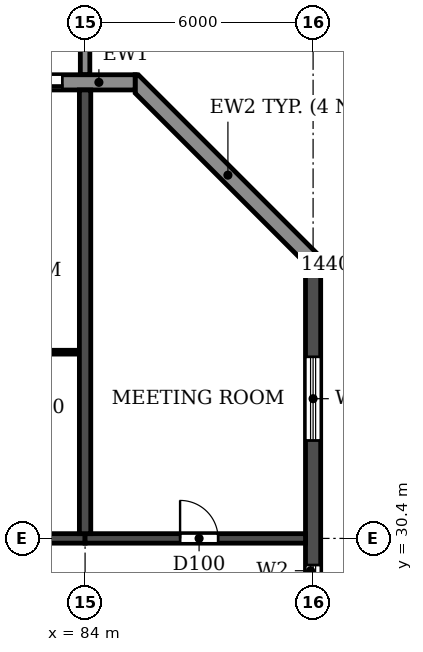
"""IFC4 building model, lengths in metres.
Left out: names, types, materials, properties, quantities, classifications, styles, units other than length and angle.
Written with IfcOpenShell. Run it as: python <this file> out.ifc"""

import sys

from ifc_helpers import new_model, si_unit, direction, frame, frame_2d, origin, place, context, subcontext, project, spatial, polyline, rectangle, outline, extrude, source, transform, mapped, element, fill, save


model = new_model("IFC4")
c1 = context("Model", 3, precision=1e-05, world=origin(), true_north=direction((0.0, 1.0)))
c2 = subcontext(c1, "Body", "Model", "MODEL_VIEW")
j1 = project(units=[si_unit("LENGTHUNIT", "METRE"), si_unit("PLANEANGLEUNIT", "RADIAN")], contexts=[c1])
p1 = place(None, origin())
s1 = spatial("IfcSite", under=j1, at=p1, CompositionType="ELEMENT")
p2 = place(p1, origin())
s2 = spatial("IfcBuilding", under=s1, at=p2, CompositionType="ELEMENT")
p3 = place(p2, frame((0.0, 0.0, 132.3)))
s3 = spatial("IfcBuildingStorey", under=s2, at=p3, CompositionType="ELEMENT", Elevation=132.3)
p4 = place(p3, frame((84.0, 30.525, 0.0), z_axis=(0.0, 0.0, 1.0), x_axis=(0.0, 1.0, 0.0)))
e1 = element("IfcWall", 1, at=p4, inside=s3, PredefinedType="SHEAR", context=c2, shape_type="SweptSolid", body=[
    extrude(rectangle(XDim=11.675, YDim=0.3, at=frame_2d((5.837, 0.0))), origin(), (0.0, 0.0, 1.0), 3.07),
])
p5 = place(p3, frame((90.0, 4.683, 0.0), z_axis=(0.0, 0.0, 1.0), x_axis=(0.0, 1.0, 0.0)))
e2 = element("IfcWall", 2, at=p5, inside=s3, PredefinedType="SHEAR", context=c2, shape_type="SweptSolid", body=[
    extrude(rectangle(XDim=33.034, YDim=0.4, at=frame_2d((16.517, 0.0))), origin(), (0.0, 0.0, 1.0), 3.07),
])
p6 = place(p5, frame((23.817, 0.0, 0.9)))
e3 = element("IfcOpeningElement", 3, at=p6, cuts=e2, PredefinedType="OPENING", context=c2, shape_type="SweptSolid", body=[
    extrude(rectangle(XDim=1.2, YDim=1.5, at=frame_2d((0.6, 0.75))), frame((0.0, 0.21, 0.0), z_axis=(0.0, -1.0, 0.0), x_axis=(1.0, 0.0, 0.0)), (0.0, 0.0, 1.0), 0.42),
])
p7 = place(p5, frame((8.017, 0.0, 0.9)))
e4 = element("IfcOpeningElement", 4, at=p7, cuts=e2, PredefinedType="OPENING", context=c2, shape_type="SweptSolid", body=[
    extrude(rectangle(XDim=1.2, YDim=1.5, at=frame_2d((0.6, 0.75))), frame((0.0, 0.21, 0.0), z_axis=(0.0, -1.0, 0.0), x_axis=(1.0, 0.0, 0.0)), (0.0, 0.0, 1.0), 0.42),
])
p8 = place(p5, frame((28.293, 0.0, 0.6)))
e5 = element("IfcOpeningElement", 5, at=p8, cuts=e2, PredefinedType="OPENING", context=c2, shape_type="SweptSolid", body=[
    extrude(rectangle(XDim=2.2, YDim=1.8, at=frame_2d((1.1, 0.9))), frame((0.0, 0.21, 0.0), z_axis=(0.0, -1.0, 0.0), x_axis=(1.0, 0.0, 0.0)), (0.0, 0.0, 1.0), 0.42),
])
p9 = place(p5, frame((2.541, 0.0, 0.6)))
e6 = element("IfcOpeningElement", 6, at=p9, cuts=e2, PredefinedType="OPENING", context=c2, shape_type="SweptSolid", body=[
    extrude(rectangle(XDim=2.2, YDim=1.8, at=frame_2d((1.1, 0.9))), frame((0.0, 0.21, 0.0), z_axis=(0.0, -1.0, 0.0), x_axis=(1.0, 0.0, 0.0)), (0.0, 0.0, 1.0), 0.42),
])
p10 = place(p3, frame((78.0, 30.4, 0.0), z_axis=(0.0, 0.0, 1.0), x_axis=(1.0, 0.0, 0.0)))
e7 = element("IfcWall", 7, at=p10, inside=s3, PredefinedType="SHEAR", context=c2, shape_type="SweptSolid", body=[
    extrude(rectangle(XDim=6.0, YDim=0.25, at=frame_2d((3.0, 0.0))), origin(), (0.0, 0.0, 1.0), 2.47),
])
p11 = place(p10, frame((2.55, 0.0, 0.0)))
e8 = element("IfcOpeningElement", 8, at=p11, cuts=e7, PredefinedType="OPENING", context=c2, shape_type="SweptSolid", body=[
    extrude(rectangle(XDim=1.0, YDim=2.1, at=frame_2d((0.5, 1.05))), frame((0.0, 0.135, 0.0), z_axis=(0.0, -1.0, 0.0), x_axis=(1.0, 0.0, 0.0)), (0.0, 0.0, 1.0), 0.27),
])
p12 = place(p3, frame((84.0, 30.4, 0.0), z_axis=(0.0, 0.0, 1.0), x_axis=(1.0, 0.0, 0.0)))
e9 = element("IfcWall", 9, at=p12, inside=s3, PredefinedType="SHEAR", context=c2, shape_type="SweptSolid", body=[
    extrude(rectangle(XDim=5.8, YDim=0.25, at=frame_2d((2.9, 0.0))), origin(), (0.0, 0.0, 1.0), 2.47),
])
p13 = place(p12, frame((2.5, 0.0, 0.0)))
e10 = element("IfcOpeningElement", 10, at=p13, cuts=e9, PredefinedType="OPENING", context=c2, shape_type="SweptSolid", body=[
    extrude(rectangle(XDim=1.0, YDim=2.1, at=frame_2d((0.5, 1.05))), frame((0.0, 0.135, 0.0), z_axis=(0.0, -1.0, 0.0), x_axis=(1.0, 0.0, 0.0)), (0.0, 0.0, 1.0), 0.27),
])
p14 = place(p3, origin())
e11 = element("IfcWall", 11, at=p14, inside=s3, PredefinedType="STANDARD", context=c2, shape_type="SweptSolid", body=[
    extrude(outline(polyline([(90.2, 37.717), (90.2, 37.8), (85.4, 42.6), (85.317, 42.6), (85.317, 42.117), (89.717, 37.717), (90.2, 37.717)])), origin(), (0.0, 0.0, 1.0), 3.07),
])
p15 = place(p3, frame((85.317, 42.4, 0.0), z_axis=(0.0, 0.0, 1.0), x_axis=(-1.0, 0.0, 0.0)))
e12 = element("IfcWall", 12, at=p15, inside=s3, PredefinedType="STANDARD", context=c2, shape_type="SweptSolid", body=[
    extrude(rectangle(XDim=68.634, YDim=0.4, at=frame_2d((34.317, 0.0))), origin(), (0.0, 0.0, 1.0), 3.07),
])
p16 = place(p15, frame((64.917, 0.0, 0.0)))
e13 = element("IfcOpeningElement", 13, at=p16, cuts=e12, PredefinedType="OPENING", context=c2, shape_type="SweptSolid", body=[
    extrude(rectangle(XDim=1.8, YDim=2.4, at=frame_2d((0.9, 1.2))), frame((0.0, 0.21, 0.0), z_axis=(0.0, -1.0, 0.0), x_axis=(1.0, 0.0, 0.0)), (0.0, 0.0, 1.0), 0.42),
])
p17 = place(p15, frame((61.717, 0.0, 0.9)))
e14 = element("IfcOpeningElement", 14, at=p17, cuts=e12, PredefinedType="OPENING", context=c2, shape_type="SweptSolid", body=[
    extrude(rectangle(XDim=2.2, YDim=1.5, at=frame_2d((1.1, 0.75))), frame((0.0, 0.21, 0.0), z_axis=(0.0, -1.0, 0.0), x_axis=(1.0, 0.0, 0.0)), (0.0, 0.0, 1.0), 0.42),
])
p18 = place(p15, frame((58.717, 0.0, 0.9)))
e15 = element("IfcOpeningElement", 15, at=p18, cuts=e12, PredefinedType="OPENING", context=c2, shape_type="SweptSolid", body=[
    extrude(rectangle(XDim=2.2, YDim=1.5, at=frame_2d((1.1, 0.75))), frame((0.0, 0.21, 0.0), z_axis=(0.0, -1.0, 0.0), x_axis=(1.0, 0.0, 0.0)), (0.0, 0.0, 1.0), 0.42),
])
p19 = place(p15, frame((55.717, 0.0, 0.9)))
e16 = element("IfcOpeningElement", 16, at=p19, cuts=e12, PredefinedType="OPENING", context=c2, shape_type="SweptSolid", body=[
    extrude(rectangle(XDim=2.2, YDim=1.5, at=frame_2d((1.1, 0.75))), frame((0.0, 0.21, 0.0), z_axis=(0.0, -1.0, 0.0), x_axis=(1.0, 0.0, 0.0)), (0.0, 0.0, 1.0), 0.42),
])
p20 = place(p15, frame((52.917, 0.0, 0.0)))
e17 = element("IfcOpeningElement", 17, at=p20, cuts=e12, PredefinedType="OPENING", context=c2, shape_type="SweptSolid", body=[
    extrude(rectangle(XDim=1.8, YDim=2.4, at=frame_2d((0.9, 1.2))), frame((0.0, 0.21, 0.0), z_axis=(0.0, -1.0, 0.0), x_axis=(1.0, 0.0, 0.0)), (0.0, 0.0, 1.0), 0.42),
])
p21 = place(p15, frame((49.717, 0.0, 0.9)))
e18 = element("IfcOpeningElement", 18, at=p21, cuts=e12, PredefinedType="OPENING", context=c2, shape_type="SweptSolid", body=[
    extrude(rectangle(XDim=2.2, YDim=1.5, at=frame_2d((1.1, 0.75))), frame((0.0, 0.21, 0.0), z_axis=(0.0, -1.0, 0.0), x_axis=(1.0, 0.0, 0.0)), (0.0, 0.0, 1.0), 0.42),
])
p22 = place(p15, frame((46.717, 0.0, 0.9)))
e19 = element("IfcOpeningElement", 19, at=p22, cuts=e12, PredefinedType="OPENING", context=c2, shape_type="SweptSolid", body=[
    extrude(rectangle(XDim=2.2, YDim=1.5, at=frame_2d((1.1, 0.75))), frame((0.0, 0.21, 0.0), z_axis=(0.0, -1.0, 0.0), x_axis=(1.0, 0.0, 0.0)), (0.0, 0.0, 1.0), 0.42),
])
p23 = place(p15, frame((43.917, 0.0, 0.0)))
e20 = element("IfcOpeningElement", 20, at=p23, cuts=e12, PredefinedType="OPENING", context=c2, shape_type="SweptSolid", body=[
    extrude(rectangle(XDim=1.8, YDim=2.4, at=frame_2d((0.9, 1.2))), frame((0.0, 0.21, 0.0), z_axis=(0.0, -1.0, 0.0), x_axis=(1.0, 0.0, 0.0)), (0.0, 0.0, 1.0), 0.42),
])
p24 = place(p15, frame((40.917, 0.0, 0.0)))
e21 = element("IfcOpeningElement", 21, at=p24, cuts=e12, PredefinedType="OPENING", context=c2, shape_type="SweptSolid", body=[
    extrude(rectangle(XDim=1.8, YDim=2.4, at=frame_2d((0.9, 1.2))), frame((0.0, 0.21, 0.0), z_axis=(0.0, -1.0, 0.0), x_axis=(1.0, 0.0, 0.0)), (0.0, 0.0, 1.0), 0.42),
])
p25 = place(p15, frame((37.717, 0.0, 0.9)))
e22 = element("IfcOpeningElement", 22, at=p25, cuts=e12, PredefinedType="OPENING", context=c2, shape_type="SweptSolid", body=[
    extrude(rectangle(XDim=2.2, YDim=1.5, at=frame_2d((1.1, 0.75))), frame((0.0, 0.21, 0.0), z_axis=(0.0, -1.0, 0.0), x_axis=(1.0, 0.0, 0.0)), (0.0, 0.0, 1.0), 0.42),
])
p26 = place(p15, frame((34.717, 0.0, 0.9)))
e23 = element("IfcOpeningElement", 23, at=p26, cuts=e12, PredefinedType="OPENING", context=c2, shape_type="SweptSolid", body=[
    extrude(rectangle(XDim=2.2, YDim=1.5, at=frame_2d((1.1, 0.75))), frame((0.0, 0.21, 0.0), z_axis=(0.0, -1.0, 0.0), x_axis=(1.0, 0.0, 0.0)), (0.0, 0.0, 1.0), 0.42),
])
p27 = place(p15, frame((31.717, 0.0, 0.9)))
e24 = element("IfcOpeningElement", 24, at=p27, cuts=e12, PredefinedType="OPENING", context=c2, shape_type="SweptSolid", body=[
    extrude(rectangle(XDim=2.2, YDim=1.5, at=frame_2d((1.1, 0.75))), frame((0.0, 0.21, 0.0), z_axis=(0.0, -1.0, 0.0), x_axis=(1.0, 0.0, 0.0)), (0.0, 0.0, 1.0), 0.42),
])
p28 = place(p15, frame((28.917, 0.0, 0.0)))
e25 = element("IfcOpeningElement", 25, at=p28, cuts=e12, PredefinedType="OPENING", context=c2, shape_type="SweptSolid", body=[
    extrude(rectangle(XDim=1.8, YDim=2.4, at=frame_2d((0.9, 1.2))), frame((0.0, 0.21, 0.0), z_axis=(0.0, -1.0, 0.0), x_axis=(1.0, 0.0, 0.0)), (0.0, 0.0, 1.0), 0.42),
])
p29 = place(p15, frame((25.717, 0.0, 0.9)))
e26 = element("IfcOpeningElement", 26, at=p29, cuts=e12, PredefinedType="OPENING", context=c2, shape_type="SweptSolid", body=[
    extrude(rectangle(XDim=2.2, YDim=1.5, at=frame_2d((1.1, 0.75))), frame((0.0, 0.21, 0.0), z_axis=(0.0, -1.0, 0.0), x_axis=(1.0, 0.0, 0.0)), (0.0, 0.0, 1.0), 0.42),
])
p30 = place(p15, frame((22.717, 0.0, 0.9)))
e27 = element("IfcOpeningElement", 27, at=p30, cuts=e12, PredefinedType="OPENING", context=c2, shape_type="SweptSolid", body=[
    extrude(rectangle(XDim=2.2, YDim=1.5, at=frame_2d((1.1, 0.75))), frame((0.0, 0.21, 0.0), z_axis=(0.0, -1.0, 0.0), x_axis=(1.0, 0.0, 0.0)), (0.0, 0.0, 1.0), 0.42),
])
p31 = place(p15, frame((19.717, 0.0, 0.9)))
e28 = element("IfcOpeningElement", 28, at=p31, cuts=e12, PredefinedType="OPENING", context=c2, shape_type="SweptSolid", body=[
    extrude(rectangle(XDim=2.2, YDim=1.5, at=frame_2d((1.1, 0.75))), frame((0.0, 0.21, 0.0), z_axis=(0.0, -1.0, 0.0), x_axis=(1.0, 0.0, 0.0)), (0.0, 0.0, 1.0), 0.42),
])
p32 = place(p15, frame((16.717, 0.0, 0.9)))
e29 = element("IfcOpeningElement", 29, at=p32, cuts=e12, PredefinedType="OPENING", context=c2, shape_type="SweptSolid", body=[
    extrude(rectangle(XDim=2.2, YDim=1.5, at=frame_2d((1.1, 0.75))), frame((0.0, 0.21, 0.0), z_axis=(0.0, -1.0, 0.0), x_axis=(1.0, 0.0, 0.0)), (0.0, 0.0, 1.0), 0.42),
])
p33 = place(p15, frame((13.917, 0.0, 0.0)))
e30 = element("IfcOpeningElement", 30, at=p33, cuts=e12, PredefinedType="OPENING", context=c2, shape_type="SweptSolid", body=[
    extrude(rectangle(XDim=1.8, YDim=2.4, at=frame_2d((0.9, 1.2))), frame((0.0, 0.21, 0.0), z_axis=(0.0, -1.0, 0.0), x_axis=(1.0, 0.0, 0.0)), (0.0, 0.0, 1.0), 0.42),
])
p34 = place(p15, frame((10.717, 0.0, 0.9)))
e31 = element("IfcOpeningElement", 31, at=p34, cuts=e12, PredefinedType="OPENING", context=c2, shape_type="SweptSolid", body=[
    extrude(rectangle(XDim=2.2, YDim=1.5, at=frame_2d((1.1, 0.75))), frame((0.0, 0.21, 0.0), z_axis=(0.0, -1.0, 0.0), x_axis=(1.0, 0.0, 0.0)), (0.0, 0.0, 1.0), 0.42),
])
p35 = place(p15, frame((7.917, 0.0, 0.0)))
e32 = element("IfcOpeningElement", 32, at=p35, cuts=e12, PredefinedType="OPENING", context=c2, shape_type="SweptSolid", body=[
    extrude(rectangle(XDim=1.8, YDim=2.4, at=frame_2d((0.9, 1.2))), frame((0.0, 0.21, 0.0), z_axis=(0.0, -1.0, 0.0), x_axis=(1.0, 0.0, 0.0)), (0.0, 0.0, 1.0), 0.42),
])
p36 = place(p15, frame((4.717, 0.0, 0.9)))
e33 = element("IfcOpeningElement", 33, at=p36, cuts=e12, PredefinedType="OPENING", context=c2, shape_type="SweptSolid", body=[
    extrude(rectangle(XDim=2.2, YDim=1.5, at=frame_2d((1.1, 0.75))), frame((0.0, 0.21, 0.0), z_axis=(0.0, -1.0, 0.0), x_axis=(1.0, 0.0, 0.0)), (0.0, 0.0, 1.0), 0.42),
])
p37 = place(p15, frame((1.917, 0.0, 0.0)))
e34 = element("IfcOpeningElement", 34, at=p37, cuts=e12, PredefinedType="OPENING", context=c2, shape_type="SweptSolid", body=[
    extrude(rectangle(XDim=1.8, YDim=2.4, at=frame_2d((0.9, 1.2))), frame((0.0, 0.21, 0.0), z_axis=(0.0, -1.0, 0.0), x_axis=(1.0, 0.0, 0.0)), (0.0, 0.0, 1.0), 0.42),
])
m1 = source(origin(), c2, "Body", "SweptSolid", [
    extrude(outline(polyline([(0.0, 0.0), (0.25, 0.0), (0.25, 3.1), (0.0, 3.1), (0.0, 0.0)])), origin(), (0.0, 0.0, 1.0), 3.1),
])
p38 = place(p3, frame((83.875, 42.6, 0.0)))
e35 = element("IfcWall", 35, at=p38, inside=s3, PredefinedType="STANDARD", context=c2, shape_type="MappedRepresentation", body=[
    mapped(m1, transform((0.0, 0.0, 0.0))),
])
p39 = place(p3, frame((81.9, 35.3, 0.0), z_axis=(0.0, 0.0, 1.0), x_axis=(1.0, 0.0, 0.0)))
e36 = element("IfcWall", 36, at=p39, inside=s3, PredefinedType="PARTITIONING", context=c2, shape_type="SweptSolid", body=[
    extrude(rectangle(XDim=1.94, YDim=0.1, at=frame_2d((0.97, 0.0))), origin(), (0.0, 0.0, 1.0), 3.07),
])
p40 = place(p6, origin())
e37 = element("IfcWindow", 37, at=p40, inside=s3, PartitioningType="SINGLE_PANEL", PredefinedType="WINDOW", context=c2, shape_type="SweptSolid", body=[
    extrude(rectangle(XDim=1.2, YDim=1.5, at=frame_2d((0.6, 0.75))), frame((0.0, 0.03, 0.0), z_axis=(0.0, -1.0, 0.0), x_axis=(1.0, 0.0, 0.0)), (0.0, 0.0, 1.0), 0.06),
])
fill(e3, e37)
p41 = place(p8, origin())
e38 = element("IfcWindow", 38, at=p41, inside=s3, PartitioningType="DOUBLE_PANEL_HORIZONTAL", PredefinedType="WINDOW", context=c2, shape_type="SweptSolid", body=[
    extrude(rectangle(XDim=2.2, YDim=1.8, at=frame_2d((1.1, 0.9))), frame((0.0, 0.03, 0.0), z_axis=(0.0, -1.0, 0.0), x_axis=(1.0, 0.0, 0.0)), (0.0, 0.0, 1.0), 0.06),
])
fill(e5, e38)
p42 = place(p37, origin())
e39 = element("IfcDoor", 39, at=p42, inside=s3, OperationType="DOUBLE_DOOR_SLIDING", PredefinedType="DOOR", context=c2, shape_type="SweptSolid", body=[
    extrude(rectangle(XDim=1.8, YDim=2.4, at=frame_2d((0.9, 1.2))), frame((0.0, 0.025, 0.0), z_axis=(0.0, -1.0, 0.0), x_axis=(1.0, 0.0, 0.0)), (0.0, 0.0, 1.0), 0.05),
])
fill(e34, e39)
p43 = place(p13, origin())
e40 = element("IfcDoor", 40, at=p43, inside=s3, OperationType="SINGLE_SWING_LEFT", PredefinedType="DOOR", context=c2, shape_type="SweptSolid", body=[
    extrude(rectangle(XDim=1.0, YDim=2.1, at=frame_2d((0.5, 1.05))), frame((0.0, 0.025, 0.0), z_axis=(0.0, -1.0, 0.0), x_axis=(1.0, 0.0, 0.0)), (0.0, 0.0, 1.0), 0.05),
])
fill(e10, e40)
save(model, sys.argv[1])
